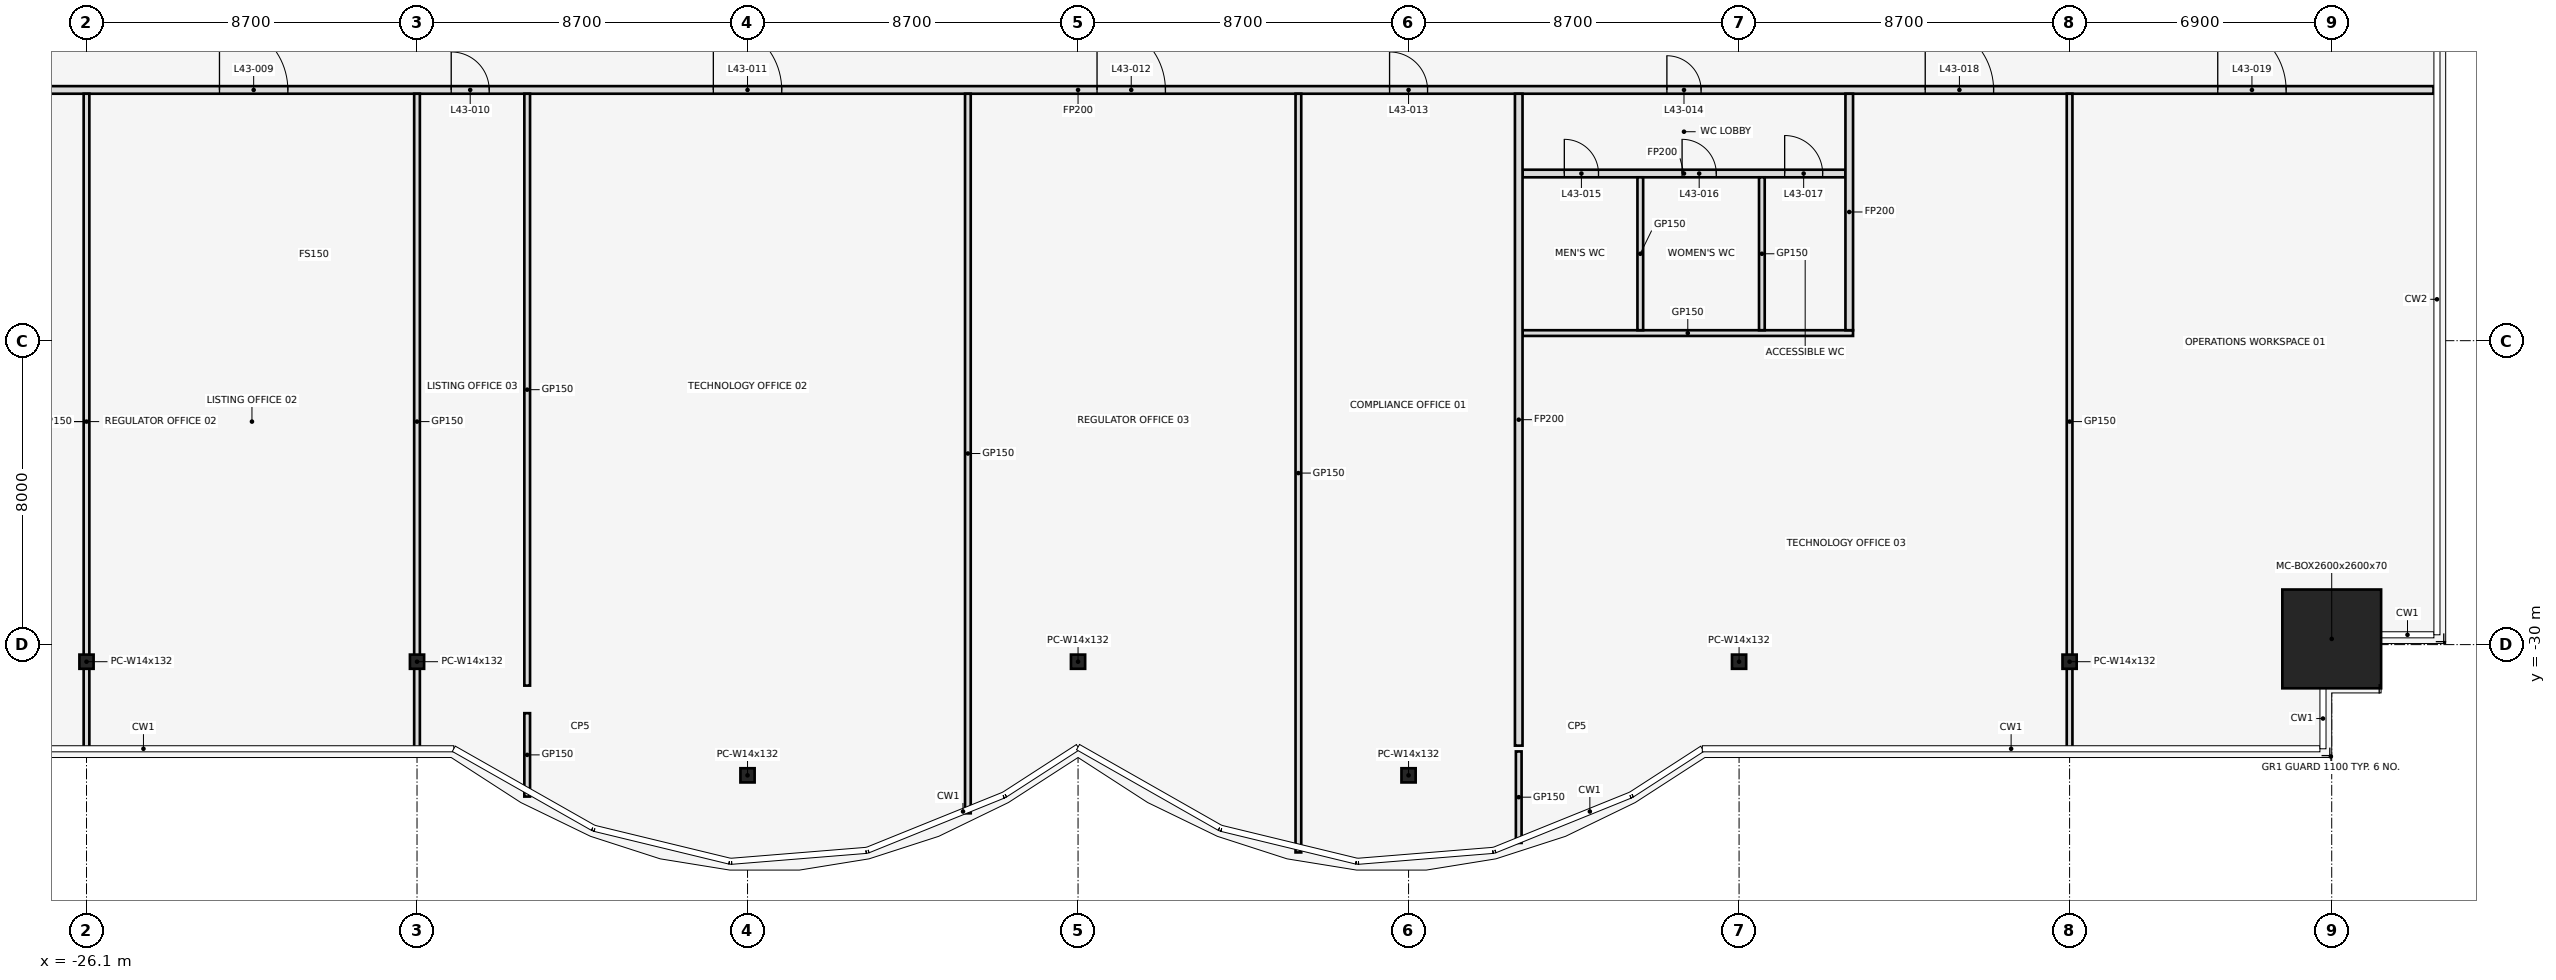
"""IFC4 building model, lengths in metres.
Left out: names, types, materials, properties, quantities, classifications, styles, units other than length and angle.
Written with IfcOpenShell. Run it as: python <this file> out.ifc"""

import sys

from ifc_helpers import new_model, si_unit, direction, frame, frame_2d, origin, origin_2d, place, context, subcontext, project, spatial, rectangle, hollow_rectangle, i_section, extrude, element, fill, save


model = new_model("IFC4")
c1 = context("Model", 3, precision=1e-05, world=origin(), true_north=direction((0.0, 1.0)))
c2 = subcontext(c1, "Body", "Model", "MODEL_VIEW")
j1 = project(units=[si_unit("LENGTHUNIT", "METRE"), si_unit("PLANEANGLEUNIT", "RADIAN")], contexts=[c1])
p1 = place(None, origin())
s1 = spatial("IfcSite", under=j1, at=p1, CompositionType="ELEMENT")
p2 = place(p1, origin())
s2 = spatial("IfcBuilding", under=s1, at=p2, CompositionType="ELEMENT")
p3 = place(p2, frame((0.0, 0.0, 195.0)))
s3 = spatial("IfcBuildingStorey", under=s2, at=p3, CompositionType="ELEMENT", Elevation=195.0)
for number, where, z_axis, x_axis in (
    (1, (-26.1, -30.45, 0.0), (0.0, 0.0, 1.0), (1.0, 0.0, 0.0)),
    (2, (-17.4, -30.45, 0.0), (0.0, 0.0, 1.0), (1.0, 0.0, 0.0)),
    (3, (-8.7, -33.441, 0.0), (0.0, 0.0, 1.0), (1.0, 0.0, 0.0)),
    (4, (0.0, -30.45, 0.0), (0.0, 0.0, 1.0), (1.0, 0.0, 0.0)),
    (5, (8.7, -33.441, 0.0), (0.0, 0.0, 1.0), (1.0, 0.0, 0.0)),
    (6, (17.4, -30.45, 0.0), (0.0, 0.0, 1.0), (1.0, 0.0, 0.0)),
    (7, (26.1, -30.45, 0.0), (0.0, 0.0, 1.0), (1.0, 0.0, 0.0)),
):
    element("IfcColumn", number, at=place(p3, frame(where, z_axis=z_axis, x_axis=x_axis)), inside=s3, PredefinedType="COLUMN", context=c2, shape_type="SweptSolid", body=[
        extrude(i_section(OverallWidth=0.373, OverallDepth=0.373, WebThickness=0.016, FlangeThickness=0.026, at=origin_2d()), origin(), (0.0, 0.0, 1.0), 4.1),
    ])
p4 = place(p3, frame((33.0, -29.85, 0.0), z_axis=(0.0, 0.0, 1.0), x_axis=(1.0, 0.0, 0.0)))
e8 = element("IfcColumn", 8, at=p4, inside=s3, PredefinedType="COLUMN", context=c2, shape_type="SweptSolid", body=[
    extrude(hollow_rectangle(XDim=2.6, YDim=2.6, WallThickness=0.07, at=origin_2d()), origin(), (0.0, 0.0, 1.0), 4.1),
])
p5 = place(p3, frame((11.7, -21.8, 0.0), z_axis=(0.0, 0.0, 1.0), x_axis=(1.0, 0.0, 0.0)))
e9 = element("IfcWall", 9, at=p5, inside=s3, PredefinedType="PARTITIONING", context=c2, shape_type="SweptSolid", body=[
    extrude(rectangle(XDim=8.7, YDim=0.15, at=frame_2d((4.35, 0.0))), origin(), (0.0, 0.0, 1.0), 2.84),
])
p6 = place(p3, frame((11.7, -17.6, 0.0), z_axis=(0.0, 0.0, 1.0), x_axis=(1.0, 0.0, 0.0)))
e10 = element("IfcWall", 10, at=p6, inside=s3, PredefinedType="PARTITIONING", context=c2, shape_type="SweptSolid", body=[
    extrude(rectangle(XDim=8.5, YDim=0.2, at=frame_2d((4.25, 0.0))), origin(), (0.0, 0.0, 1.0), 2.84),
])
p7 = place(p6, frame((1.1, 0.0, 0.0)))
e11 = element("IfcOpeningElement", 11, at=p7, cuts=e10, PredefinedType="OPENING", context=c2, shape_type="SweptSolid", body=[
    extrude(rectangle(XDim=0.9, YDim=2.1, at=frame_2d((0.45, 1.05))), frame((0.0, 0.112, 0.0), z_axis=(0.0, -1.0, 0.0), x_axis=(1.0, 0.0, 0.0)), (0.0, 0.0, 1.0), 0.224),
])
p8 = place(p6, frame((4.2, 0.0, 0.0)))
e12 = element("IfcOpeningElement", 12, at=p8, cuts=e10, PredefinedType="OPENING", context=c2, shape_type="SweptSolid", body=[
    extrude(rectangle(XDim=0.9, YDim=2.1, at=frame_2d((0.45, 1.05))), frame((0.0, 0.112, 0.0), z_axis=(0.0, -1.0, 0.0), x_axis=(1.0, 0.0, 0.0)), (0.0, 0.0, 1.0), 0.224),
])
p9 = place(p6, frame((6.9, 0.0, 0.0)))
e13 = element("IfcOpeningElement", 13, at=p9, cuts=e10, PredefinedType="OPENING", context=c2, shape_type="SweptSolid", body=[
    extrude(rectangle(XDim=1.0, YDim=2.1, at=frame_2d((0.5, 1.05))), frame((0.0, 0.112, 0.0), z_axis=(0.0, -1.0, 0.0), x_axis=(1.0, 0.0, 0.0)), (0.0, 0.0, 1.0), 0.224),
])
p10 = place(p3, frame((-35.68, -15.4, 0.0), z_axis=(0.0, 0.0, 1.0), x_axis=(1.0, 0.0, 0.0)))
e14 = element("IfcWall", 14, at=p10, inside=s3, PredefinedType="PARTITIONING", context=c2, shape_type="SweptSolid", body=[
    extrude(rectangle(XDim=71.36, YDim=0.2, at=frame_2d((35.68, 0.0))), origin(), (0.0, 0.0, 1.0), 2.84),
])
p11 = place(p10, frame((2.8, 0.0, 0.0)))
e15 = element("IfcOpeningElement", 15, at=p11, cuts=e14, PredefinedType="OPENING", context=c2, shape_type="SweptSolid", body=[
    extrude(rectangle(XDim=1.0, YDim=2.1, at=frame_2d((0.5, 1.05))), frame((0.0, 0.112, 0.0), z_axis=(0.0, -1.0, 0.0), x_axis=(1.0, 0.0, 0.0)), (0.0, 0.0, 1.0), 0.224),
])
p12 = place(p10, frame((7.58, 0.0, 0.0)))
e16 = element("IfcOpeningElement", 16, at=p12, cuts=e14, PredefinedType="OPENING", context=c2, shape_type="SweptSolid", body=[
    extrude(rectangle(XDim=1.0, YDim=2.1, at=frame_2d((0.5, 1.05))), frame((0.0, 0.112, 0.0), z_axis=(0.0, -1.0, 0.0), x_axis=(1.0, 0.0, 0.0)), (0.0, 0.0, 1.0), 0.224),
])
p13 = place(p10, frame((13.08, 0.0, 0.0)))
e17 = element("IfcOpeningElement", 17, at=p13, cuts=e14, PredefinedType="OPENING", context=c2, shape_type="SweptSolid", body=[
    extrude(rectangle(XDim=1.8, YDim=2.1, at=frame_2d((0.9, 1.05))), frame((0.0, 0.112, 0.0), z_axis=(0.0, -1.0, 0.0), x_axis=(1.0, 0.0, 0.0)), (0.0, 0.0, 1.0), 0.224),
])
p14 = place(p10, frame((19.18, 0.0, 0.0)))
e18 = element("IfcOpeningElement", 18, at=p14, cuts=e14, PredefinedType="OPENING", context=c2, shape_type="SweptSolid", body=[
    extrude(rectangle(XDim=1.0, YDim=2.1, at=frame_2d((0.5, 1.05))), frame((0.0, 0.112, 0.0), z_axis=(0.0, -1.0, 0.0), x_axis=(1.0, 0.0, 0.0)), (0.0, 0.0, 1.0), 0.224),
])
p15 = place(p10, frame((26.08, 0.0, 0.0)))
e19 = element("IfcOpeningElement", 19, at=p15, cuts=e14, PredefinedType="OPENING", context=c2, shape_type="SweptSolid", body=[
    extrude(rectangle(XDim=1.8, YDim=2.1, at=frame_2d((0.9, 1.05))), frame((0.0, 0.112, 0.0), z_axis=(0.0, -1.0, 0.0), x_axis=(1.0, 0.0, 0.0)), (0.0, 0.0, 1.0), 0.224),
])
p16 = place(p10, frame((36.18, 0.0, 0.0)))
e20 = element("IfcOpeningElement", 20, at=p16, cuts=e14, PredefinedType="OPENING", context=c2, shape_type="SweptSolid", body=[
    extrude(rectangle(XDim=1.8, YDim=2.1, at=frame_2d((0.9, 1.05))), frame((0.0, 0.112, 0.0), z_axis=(0.0, -1.0, 0.0), x_axis=(1.0, 0.0, 0.0)), (0.0, 0.0, 1.0), 0.224),
])
p17 = place(p10, frame((43.88, 0.0, 0.0)))
e21 = element("IfcOpeningElement", 21, at=p17, cuts=e14, PredefinedType="OPENING", context=c2, shape_type="SweptSolid", body=[
    extrude(rectangle(XDim=1.0, YDim=2.1, at=frame_2d((0.5, 1.05))), frame((0.0, 0.112, 0.0), z_axis=(0.0, -1.0, 0.0), x_axis=(1.0, 0.0, 0.0)), (0.0, 0.0, 1.0), 0.224),
])
p18 = place(p10, frame((51.18, 0.0, 0.0)))
e22 = element("IfcOpeningElement", 22, at=p18, cuts=e14, PredefinedType="OPENING", context=c2, shape_type="SweptSolid", body=[
    extrude(rectangle(XDim=0.9, YDim=2.1, at=frame_2d((0.45, 1.05))), frame((0.0, 0.112, 0.0), z_axis=(0.0, -1.0, 0.0), x_axis=(1.0, 0.0, 0.0)), (0.0, 0.0, 1.0), 0.224),
])
p19 = place(p10, frame((57.98, 0.0, 0.0)))
e23 = element("IfcOpeningElement", 23, at=p19, cuts=e14, PredefinedType="OPENING", context=c2, shape_type="SweptSolid", body=[
    extrude(rectangle(XDim=1.8, YDim=2.1, at=frame_2d((0.9, 1.05))), frame((0.0, 0.112, 0.0), z_axis=(0.0, -1.0, 0.0), x_axis=(1.0, 0.0, 0.0)), (0.0, 0.0, 1.0), 0.224),
])
p20 = place(p10, frame((65.68, 0.0, 0.0)))
e24 = element("IfcOpeningElement", 24, at=p20, cuts=e14, PredefinedType="OPENING", context=c2, shape_type="SweptSolid", body=[
    extrude(rectangle(XDim=1.8, YDim=2.1, at=frame_2d((0.9, 1.05))), frame((0.0, 0.112, 0.0), z_axis=(0.0, -1.0, 0.0), x_axis=(1.0, 0.0, 0.0)), (0.0, 0.0, 1.0), 0.224),
])
for number, where, z_axis, x_axis in (
    (25, (-26.1, -32.76, 0.0), (0.0, 0.0, 1.0), (0.0, 1.0, 0.0)),
    (26, (-17.4, -32.76, 0.0), (0.0, 0.0, 1.0), (0.0, 1.0, 0.0)),
):
    element("IfcWall", number, at=place(p3, frame(where, z_axis=z_axis, x_axis=x_axis)), inside=s3, PredefinedType="PARTITIONING", context=c2, shape_type="SweptSolid", body=[
        extrude(rectangle(XDim=17.26, YDim=0.15, at=frame_2d((8.63, 0.0))), origin(), (0.0, 0.0, 1.0), 2.84),
    ])
p21 = place(p3, frame((-14.5, -34.0, 0.0), z_axis=(0.0, 0.0, 1.0), x_axis=(0.0, 1.0, 0.0)))
e27 = element("IfcWall", 27, at=p21, inside=s3, PredefinedType="PARTITIONING", context=c2, shape_type="SweptSolid", body=[
    extrude(rectangle(XDim=2.195, YDim=0.15, at=frame_2d((1.098, 0.0))), origin(), (0.0, 0.0, 1.0), 2.84),
])
p22 = place(p3, frame((-14.5, -31.079, 0.0), z_axis=(0.0, 0.0, 1.0), x_axis=(0.0, 1.0, 0.0)))
e28 = element("IfcWall", 28, at=p22, inside=s3, PredefinedType="PARTITIONING", context=c2, shape_type="SweptSolid", body=[
    extrude(rectangle(XDim=15.579, YDim=0.15, at=frame_2d((7.79, 0.0))), origin(), (0.0, 0.0, 1.0), 2.84),
])
p23 = place(p3, frame((-2.9, -34.44, 0.0), z_axis=(0.0, 0.0, 1.0), x_axis=(0.0, 1.0, 0.0)))
e29 = element("IfcWall", 29, at=p23, inside=s3, PredefinedType="PARTITIONING", context=c2, shape_type="SweptSolid", body=[
    extrude(rectangle(XDim=18.94, YDim=0.15, at=frame_2d((9.47, 0.0))), origin(), (0.0, 0.0, 1.0), 2.84),
])
p24 = place(p3, frame((5.8, -35.47, 0.0), z_axis=(0.0, 0.0, 1.0), x_axis=(0.0, 1.0, 0.0)))
e30 = element("IfcWall", 30, at=p24, inside=s3, PredefinedType="PARTITIONING", context=c2, shape_type="SweptSolid", body=[
    extrude(rectangle(XDim=19.97, YDim=0.15, at=frame_2d((9.985, 0.0))), origin(), (0.0, 0.0, 1.0), 2.84),
])
p25 = place(p3, frame((11.6, -35.22, 0.0), z_axis=(0.0, 0.0, 1.0), x_axis=(0.0, 1.0, 0.0)))
e31 = element("IfcWall", 31, at=p25, inside=s3, PredefinedType="PARTITIONING", context=c2, shape_type="SweptSolid", body=[
    extrude(rectangle(XDim=2.408, YDim=0.15, at=frame_2d((1.204, 0.0))), origin(), (0.0, 0.0, 1.0), 2.84),
])
p26 = place(p3, frame((11.6, -32.659, 0.0), z_axis=(0.0, 0.0, 1.0), x_axis=(0.0, 1.0, 0.0)))
e32 = element("IfcWall", 32, at=p26, inside=s3, PredefinedType="PARTITIONING", context=c2, shape_type="SweptSolid", body=[
    extrude(rectangle(XDim=17.159, YDim=0.2, at=frame_2d((8.58, 0.0))), origin(), (0.0, 0.0, 1.0), 2.84),
])
for number, where, z_axis, x_axis in (
    (33, (14.8, -21.725, 0.0), (0.0, 0.0, 1.0), (0.0, 1.0, 0.0)),
    (34, (18.0, -21.725, 0.0), (0.0, 0.0, 1.0), (0.0, 1.0, 0.0)),
):
    element("IfcWall", number, at=place(p3, frame(where, z_axis=z_axis, x_axis=x_axis)), inside=s3, PredefinedType="PARTITIONING", context=c2, shape_type="SweptSolid", body=[
        extrude(rectangle(XDim=4.025, YDim=0.15, at=frame_2d((2.013, 0.0))), origin(), (0.0, 0.0, 1.0), 2.84),
    ])
p27 = place(p3, frame((20.3, -21.725, 0.0), z_axis=(0.0, 0.0, 1.0), x_axis=(0.0, 1.0, 0.0)))
e35 = element("IfcWall", 35, at=p27, inside=s3, PredefinedType="PARTITIONING", context=c2, shape_type="SweptSolid", body=[
    extrude(rectangle(XDim=6.225, YDim=0.2, at=frame_2d((3.113, 0.0))), origin(), (0.0, 0.0, 1.0), 2.84),
])
p28 = place(p3, frame((26.1, -32.76, 0.0), z_axis=(0.0, 0.0, 1.0), x_axis=(0.0, 1.0, 0.0)))
e36 = element("IfcWall", 36, at=p28, inside=s3, PredefinedType="PARTITIONING", context=c2, shape_type="SweptSolid", body=[
    extrude(rectangle(XDim=17.26, YDim=0.15, at=frame_2d((8.63, 0.0))), origin(), (0.0, 0.0, 1.0), 2.84),
])
p29 = place(p13, origin())
e37 = element("IfcDoor", 37, at=p29, inside=s3, OperationType="SINGLE_SWING_LEFT", PredefinedType="DOOR", context=c2, shape_type="SweptSolid", body=[
    extrude(rectangle(XDim=1.8, YDim=2.1, at=frame_2d((0.9, 1.05))), frame((0.0, 0.025, 0.0), z_axis=(0.0, -1.0, 0.0), x_axis=(1.0, 0.0, 0.0)), (0.0, 0.0, 1.0), 0.05),
])
fill(e17, e37)
p30 = place(p14, frame((1.0, 0.0, 0.0), z_axis=(0.0, 0.0, 1.0), x_axis=(-1.0, 0.0, 0.0)))
e38 = element("IfcDoor", 38, at=p30, inside=s3, OperationType="SINGLE_SWING_LEFT", PredefinedType="DOOR", context=c2, shape_type="SweptSolid", body=[
    extrude(rectangle(XDim=1.0, YDim=2.1, at=frame_2d((0.5, 1.05))), frame((0.0, 0.025, 0.0), z_axis=(0.0, -1.0, 0.0), x_axis=(1.0, 0.0, 0.0)), (0.0, 0.0, 1.0), 0.05),
])
fill(e18, e38)
p31 = place(p15, origin())
e39 = element("IfcDoor", 39, at=p31, inside=s3, OperationType="SINGLE_SWING_LEFT", PredefinedType="DOOR", context=c2, shape_type="SweptSolid", body=[
    extrude(rectangle(XDim=1.8, YDim=2.1, at=frame_2d((0.9, 1.05))), frame((0.0, 0.025, 0.0), z_axis=(0.0, -1.0, 0.0), x_axis=(1.0, 0.0, 0.0)), (0.0, 0.0, 1.0), 0.05),
])
fill(e19, e39)
p32 = place(p16, origin())
e40 = element("IfcDoor", 40, at=p32, inside=s3, OperationType="SINGLE_SWING_LEFT", PredefinedType="DOOR", context=c2, shape_type="SweptSolid", body=[
    extrude(rectangle(XDim=1.8, YDim=2.1, at=frame_2d((0.9, 1.05))), frame((0.0, 0.025, 0.0), z_axis=(0.0, -1.0, 0.0), x_axis=(1.0, 0.0, 0.0)), (0.0, 0.0, 1.0), 0.05),
])
fill(e20, e40)
p33 = place(p17, frame((1.0, 0.0, 0.0), z_axis=(0.0, 0.0, 1.0), x_axis=(-1.0, 0.0, 0.0)))
e41 = element("IfcDoor", 41, at=p33, inside=s3, OperationType="SINGLE_SWING_LEFT", PredefinedType="DOOR", context=c2, shape_type="SweptSolid", body=[
    extrude(rectangle(XDim=1.0, YDim=2.1, at=frame_2d((0.5, 1.05))), frame((0.0, 0.025, 0.0), z_axis=(0.0, -1.0, 0.0), x_axis=(1.0, 0.0, 0.0)), (0.0, 0.0, 1.0), 0.05),
])
fill(e21, e41)
p34 = place(p18, frame((0.9, 0.0, 0.0), z_axis=(0.0, 0.0, 1.0), x_axis=(-1.0, 0.0, 0.0)))
e42 = element("IfcDoor", 42, at=p34, inside=s3, OperationType="SINGLE_SWING_RIGHT", PredefinedType="DOOR", context=c2, shape_type="SweptSolid", body=[
    extrude(rectangle(XDim=0.9, YDim=2.1, at=frame_2d((0.45, 1.05))), frame((0.0, 0.025, 0.0), z_axis=(0.0, -1.0, 0.0), x_axis=(1.0, 0.0, 0.0)), (0.0, 0.0, 1.0), 0.05),
])
fill(e22, e42)
p35 = place(p7, frame((0.9, 0.0, 0.0), z_axis=(0.0, 0.0, 1.0), x_axis=(-1.0, 0.0, 0.0)))
e43 = element("IfcDoor", 43, at=p35, inside=s3, OperationType="SINGLE_SWING_RIGHT", PredefinedType="DOOR", context=c2, shape_type="SweptSolid", body=[
    extrude(rectangle(XDim=0.9, YDim=2.1, at=frame_2d((0.45, 1.05))), frame((0.0, 0.025, 0.0), z_axis=(0.0, -1.0, 0.0), x_axis=(1.0, 0.0, 0.0)), (0.0, 0.0, 1.0), 0.05),
])
fill(e11, e43)
p36 = place(p8, frame((0.9, 0.0, 0.0), z_axis=(0.0, 0.0, 1.0), x_axis=(-1.0, 0.0, 0.0)))
e44 = element("IfcDoor", 44, at=p36, inside=s3, OperationType="SINGLE_SWING_LEFT", PredefinedType="DOOR", context=c2, shape_type="SweptSolid", body=[
    extrude(rectangle(XDim=0.9, YDim=2.1, at=frame_2d((0.45, 1.05))), frame((0.0, 0.025, 0.0), z_axis=(0.0, -1.0, 0.0), x_axis=(1.0, 0.0, 0.0)), (0.0, 0.0, 1.0), 0.05),
])
fill(e12, e44)
p37 = place(p9, frame((1.0, 0.0, 0.0), z_axis=(0.0, 0.0, 1.0), x_axis=(-1.0, 0.0, 0.0)))
e45 = element("IfcDoor", 45, at=p37, inside=s3, OperationType="SINGLE_SWING_RIGHT", PredefinedType="DOOR", context=c2, shape_type="SweptSolid", body=[
    extrude(rectangle(XDim=1.0, YDim=2.1, at=frame_2d((0.5, 1.05))), frame((0.0, 0.025, 0.0), z_axis=(0.0, -1.0, 0.0), x_axis=(1.0, 0.0, 0.0)), (0.0, 0.0, 1.0), 0.05),
])
fill(e13, e45)
p38 = place(p19, origin())
e46 = element("IfcDoor", 46, at=p38, inside=s3, OperationType="SINGLE_SWING_LEFT", PredefinedType="DOOR", context=c2, shape_type="SweptSolid", body=[
    extrude(rectangle(XDim=1.8, YDim=2.1, at=frame_2d((0.9, 1.05))), frame((0.0, 0.025, 0.0), z_axis=(0.0, -1.0, 0.0), x_axis=(1.0, 0.0, 0.0)), (0.0, 0.0, 1.0), 0.05),
])
fill(e23, e46)
p39 = place(p20, origin())
e47 = element("IfcDoor", 47, at=p39, inside=s3, OperationType="SINGLE_SWING_LEFT", PredefinedType="DOOR", context=c2, shape_type="SweptSolid", body=[
    extrude(rectangle(XDim=1.8, YDim=2.1, at=frame_2d((0.9, 1.05))), frame((0.0, 0.025, 0.0), z_axis=(0.0, -1.0, 0.0), x_axis=(1.0, 0.0, 0.0)), (0.0, 0.0, 1.0), 0.05),
])
fill(e24, e47)
save(model, sys.argv[1])
